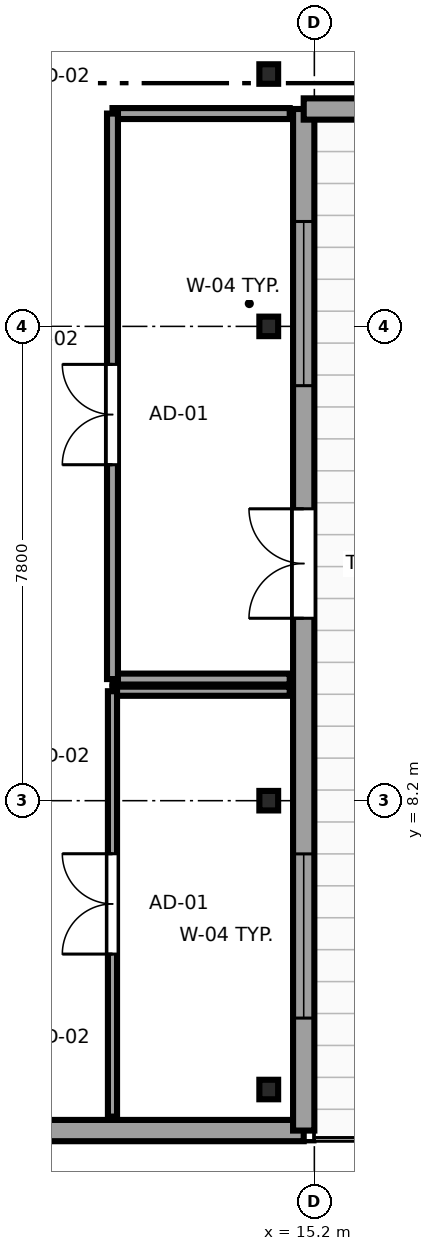
"""IFC4 building model, lengths in metres.
Left out: names, types, materials, properties, quantities, classifications, styles, units other than length and angle.
Written with IfcOpenShell. Run it as: python <this file> out.ifc"""

import sys

from ifc_helpers import new_model, si_unit, direction, frame, frame_2d, origin, origin_2d, place, context, subcontext, project, spatial, rectangle, i_section, extrude, source, transform, mapped, element, fill, save


model = new_model("IFC4")
c1 = context("Model", 3, precision=1e-05, world=origin(), true_north=direction((0.0, 1.0)))
c2 = subcontext(c1, "Body", "Model", "MODEL_VIEW")
j1 = project(units=[si_unit("LENGTHUNIT", "METRE"), si_unit("PLANEANGLEUNIT", "RADIAN")], contexts=[c1])
p1 = place(None, origin())
s1 = spatial("IfcSite", under=j1, at=p1, CompositionType="ELEMENT")
p2 = place(p1, origin())
s2 = spatial("IfcBuilding", under=s1, at=p2, CompositionType="ELEMENT")
p3 = place(p2, frame((0.0, 0.0, 241.65)))
s3 = spatial("IfcBuildingStorey", under=s2, at=p3, CompositionType="ELEMENT", Elevation=241.65)
m1 = source(origin(), c2, "Body", "SweptSolid", [
    extrude(i_section(OverallWidth=0.309, OverallDepth=0.321, WebThickness=0.014, FlangeThickness=0.022, FilletRadius=0.017, at=origin_2d()), origin(), (0.0, 0.0, 1.0), 3.55),
])
for number, where, z_axis, x_axis in (
    (1, (14.45, 3.45, 0.0), (0.0, 0.0, 1.0), (1.0, 0.0, 0.0)),
    (2, (14.45, 8.2, 0.0), (0.0, 0.0, 1.0), (1.0, 0.0, 0.0)),
    (3, (14.45, 16.0, 0.0), (0.0, 0.0, 1.0), (1.0, 0.0, 0.0)),
    (4, (14.45, 20.15, 0.0), (0.0, 0.0, 1.0), (1.0, 0.0, 0.0)),
):
    element("IfcColumn", number, at=place(p3, frame(where, z_axis=z_axis, x_axis=x_axis)), inside=s3, PredefinedType="COLUMN", context=c2, shape_type="MappedRepresentation", body=[
        mapped(m1, transform((0.0, 0.0, 0.0), x_axis=(1.0, 0.0, 0.0), y_axis=(0.0, 1.0, 0.0), z_axis=(0.0, 0.0, 1.0), scale=1.0)),
    ])
p4 = place(p3, frame((7.017, 2.775, 0.0), z_axis=(0.0, 0.0, 1.0), x_axis=(1.0, 0.0, 0.0)))
e5 = element("IfcWall", 5, at=p4, inside=s3, PredefinedType="SOLIDWALL", context=c2, shape_type="SweptSolid", body=[
    extrude(rectangle(XDim=8.008, YDim=0.35, at=frame_2d((4.004, 0.0))), origin(), (0.0, 0.0, 1.0), 3.37),
])
p5 = place(p4, frame((0.791, 0.0, 0.62)))
e6 = element("IfcOpeningElement", 6, at=p5, cuts=e5, PredefinedType="OPENING", context=c2, shape_type="SweptSolid", body=[
    extrude(rectangle(XDim=1.5, YDim=1.55, at=frame_2d((0.75, 0.775))), frame((0.0, 0.185, 0.0), z_axis=(0.0, -1.0, 0.0), x_axis=(1.0, 0.0, 0.0)), (0.0, 0.0, 1.0), 0.37),
])
p6 = place(p3, frame((15.025, 2.775, 0.0), z_axis=(0.0, 0.0, 1.0), x_axis=(0.0, 1.0, 0.0)))
e7 = element("IfcWall", 7, at=p6, inside=s3, PredefinedType="SOLIDWALL", context=c2, shape_type="SweptSolid", body=[
    extrude(rectangle(XDim=16.8, YDim=0.35, at=frame_2d((8.4, 0.0))), origin(), (0.0, 0.0, 1.0), 3.37),
])
p7 = place(p6, frame((10.225, 0.0, 0.0), z_axis=(0.0, 0.0, 1.0), x_axis=(-1.0, 0.0, 0.0)))
e8 = element("IfcOpeningElement", 8, at=p7, cuts=e7, PredefinedType="OPENING", context=c2, shape_type="SweptSolid", body=[
    extrude(rectangle(XDim=1.8, YDim=2.15, at=frame_2d((0.9, 1.075))), frame((0.0, 0.185, 0.0), z_axis=(0.0, -1.0, 0.0), x_axis=(1.0, 0.0, 0.0)), (0.0, 0.0, 1.0), 0.37),
])
p8 = place(p6, frame((1.85, 0.0, 0.68)))
e9 = element("IfcOpeningElement", 9, at=p8, cuts=e7, PredefinedType="OPENING", context=c2, shape_type="SweptSolid", body=[
    extrude(rectangle(XDim=2.7, YDim=1.95, at=frame_2d((1.35, 0.975))), frame((0.0, 0.185, 0.0), z_axis=(0.0, -1.0, 0.0), x_axis=(1.0, 0.0, 0.0)), (0.0, 0.0, 1.0), 0.37),
])
p9 = place(p6, frame((12.25, 0.0, 0.68)))
e10 = element("IfcOpeningElement", 10, at=p9, cuts=e7, PredefinedType="OPENING", context=c2, shape_type="SweptSolid", body=[
    extrude(rectangle(XDim=2.7, YDim=1.95, at=frame_2d((1.35, 0.975))), frame((0.0, 0.185, 0.0), z_axis=(0.0, -1.0, 0.0), x_axis=(1.0, 0.0, 0.0)), (0.0, 0.0, 1.0), 0.37),
])
p10 = place(p3, frame((15.025, 19.575, 0.0), z_axis=(0.0, 0.0, 1.0), x_axis=(1.0, 0.0, 0.0)))
e11 = element("IfcWall", 11, at=p10, inside=s3, PredefinedType="SOLIDWALL", context=c2, shape_type="SweptSolid", body=[
    extrude(rectangle(XDim=17.065, YDim=0.35, at=frame_2d((8.533, 0.0))), origin(), (0.0, 0.0, 1.0), 3.37),
])
p11 = place(p10, frame((1.894, 0.0, 0.68)))
e12 = element("IfcOpeningElement", 12, at=p11, cuts=e11, PredefinedType="OPENING", context=c2, shape_type="SweptSolid", body=[
    extrude(rectangle(XDim=2.7, YDim=1.95, at=frame_2d((1.35, 0.975))), frame((0.0, 0.185, 0.0), z_axis=(0.0, -1.0, 0.0), x_axis=(1.0, 0.0, 0.0)), (0.0, 0.0, 1.0), 0.37),
])
p12 = place(p10, frame((7.183, 0.0, 0.68)))
e13 = element("IfcOpeningElement", 13, at=p12, cuts=e11, PredefinedType="OPENING", context=c2, shape_type="SweptSolid", body=[
    extrude(rectangle(XDim=2.7, YDim=1.95, at=frame_2d((1.35, 0.975))), frame((0.0, 0.185, 0.0), z_axis=(0.0, -1.0, 0.0), x_axis=(1.0, 0.0, 0.0)), (0.0, 0.0, 1.0), 0.37),
])
p13 = place(p10, frame((12.471, 0.0, 0.68)))
e14 = element("IfcOpeningElement", 14, at=p13, cuts=e11, PredefinedType="OPENING", context=c2, shape_type="SweptSolid", body=[
    extrude(rectangle(XDim=2.7, YDim=1.95, at=frame_2d((1.35, 0.975))), frame((0.0, 0.185, 0.0), z_axis=(0.0, -1.0, 0.0), x_axis=(1.0, 0.0, 0.0)), (0.0, 0.0, 1.0), 0.37),
])
for number, where, z_axis, x_axis in (
    (15, (11.88, 10.2, 0.0), (0.0, 0.0, 1.0), (1.0, 0.0, 0.0)),
    (16, (11.88, 19.5, 0.0), (0.0, 0.0, 1.0), (1.0, 0.0, 0.0)),
):
    element("IfcWall", number, at=place(p3, frame(where, z_axis=z_axis, x_axis=x_axis)), inside=s3, PredefinedType="PARTITIONING", context=c2, shape_type="SweptSolid", body=[
        extrude(rectangle(XDim=2.915, YDim=0.18, at=frame_2d((1.458, 0.0))), origin(), (0.0, 0.0, 1.0), 3.37),
    ])
p14 = place(p3, frame((11.88, 10.2, 0.0), z_axis=(0.0, 0.0, 1.0), x_axis=(0.0, 1.0, 0.0)))
e17 = element("IfcWall", 17, at=p14, inside=s3, PredefinedType="PARTITIONING", context=c2, shape_type="SweptSolid", body=[
    extrude(rectangle(XDim=9.3, YDim=0.18, at=frame_2d((4.65, 0.0))), origin(), (0.0, 0.0, 1.0), 3.37),
])
p15 = place(p14, frame((3.525, 0.0, 0.0)))
e18 = element("IfcOpeningElement", 18, at=p15, cuts=e17, PredefinedType="OPENING", context=c2, shape_type="SweptSolid", body=[
    extrude(rectangle(XDim=1.65, YDim=2.15, at=frame_2d((0.825, 1.075))), frame((0.0, 0.1, 0.0), z_axis=(0.0, -1.0, 0.0), x_axis=(1.0, 0.0, 0.0)), (0.0, 0.0, 1.0), 0.2),
])
p16 = place(p3, frame((11.88, 10.0, 0.0), z_axis=(0.0, 0.0, 1.0), x_axis=(1.0, 0.0, 0.0)))
e19 = element("IfcWall", 19, at=p16, inside=s3, PredefinedType="PARTITIONING", context=c2, shape_type="SweptSolid", body=[
    extrude(rectangle(XDim=2.915, YDim=0.15, at=frame_2d((1.458, 0.0))), origin(), (0.0, 0.0, 1.0), 3.37),
])
p17 = place(p3, frame((11.88, 3.005, 0.0), z_axis=(0.0, 0.0, 1.0), x_axis=(0.0, 1.0, 0.0)))
e20 = element("IfcWall", 20, at=p17, inside=s3, PredefinedType="PARTITIONING", context=c2, shape_type="SweptSolid", body=[
    extrude(rectangle(XDim=6.995, YDim=0.15, at=frame_2d((3.498, 0.0))), origin(), (0.0, 0.0, 1.0), 3.37),
])
p18 = place(p17, frame((2.673, 0.0, 0.0)))
e21 = element("IfcOpeningElement", 21, at=p18, cuts=e20, PredefinedType="OPENING", context=c2, shape_type="SweptSolid", body=[
    extrude(rectangle(XDim=1.65, YDim=2.15, at=frame_2d((0.825, 1.075))), frame((0.0, 0.085, 0.0), z_axis=(0.0, -1.0, 0.0), x_axis=(1.0, 0.0, 0.0)), (0.0, 0.0, 1.0), 0.17),
])
m2 = source(origin(), c2, "Body", "SweptSolid", [
    extrude(rectangle(XDim=1.8, YDim=2.15, at=frame_2d((0.9, 1.075))), frame((0.0, 0.025, 0.0), z_axis=(0.0, -1.0, 0.0), x_axis=(1.0, 0.0, 0.0)), (0.0, 0.0, 1.0), 0.05),
])
p19 = place(p7, origin())
e22 = element("IfcDoor", 22, at=p19, inside=s3, OperationType="DOUBLE_DOOR_SINGLE_SWING", PredefinedType="DOOR", context=c2, shape_type="MappedRepresentation", body=[
    mapped(m2, transform((0.0, 0.0, 0.0), x_axis=(1.0, 0.0, 0.0), y_axis=(0.0, 1.0, 0.0), z_axis=(0.0, 0.0, 1.0), scale=1.0)),
])
fill(e8, e22)
m3 = source(origin(), c2, "Body", "SweptSolid", [
    extrude(rectangle(XDim=2.7, YDim=1.95, at=frame_2d((1.35, 0.975))), frame((0.0, 0.09, 0.0), z_axis=(0.0, -1.0, 0.0), x_axis=(1.0, 0.0, 0.0)), (0.0, 0.0, 1.0), 0.06),
])
p20 = place(p8, origin())
e23 = element("IfcWindow", 23, at=p20, inside=s3, PartitioningType="TRIPLE_PANEL_HORIZONTAL", PredefinedType="WINDOW", context=c2, shape_type="MappedRepresentation", body=[
    mapped(m3, transform((0.0, 0.0, 0.0), x_axis=(1.0, 0.0, 0.0), y_axis=(0.0, 1.0, 0.0), z_axis=(0.0, 0.0, 1.0), scale=1.0)),
])
fill(e9, e23)
p21 = place(p9, origin())
e24 = element("IfcWindow", 24, at=p21, inside=s3, PartitioningType="TRIPLE_PANEL_HORIZONTAL", PredefinedType="WINDOW", context=c2, shape_type="MappedRepresentation", body=[
    mapped(m3, transform((0.0, 0.0, 0.0), x_axis=(1.0, 0.0, 0.0), y_axis=(0.0, 1.0, 0.0), z_axis=(0.0, 0.0, 1.0), scale=1.0)),
])
fill(e10, e24)
m4 = source(origin(), c2, "Body", "SweptSolid", [
    extrude(rectangle(XDim=1.65, YDim=2.15, at=frame_2d((0.825, 1.075))), frame((0.0, 0.025, 0.0), z_axis=(0.0, -1.0, 0.0), x_axis=(1.0, 0.0, 0.0)), (0.0, 0.0, 1.0), 0.05),
])
p22 = place(p15, origin())
e25 = element("IfcDoor", 25, at=p22, inside=s3, OperationType="DOUBLE_DOOR_SINGLE_SWING", PredefinedType="DOOR", context=c2, shape_type="MappedRepresentation", body=[
    mapped(m4, transform((0.0, 0.0, 0.0), x_axis=(1.0, 0.0, 0.0), y_axis=(0.0, 1.0, 0.0), z_axis=(0.0, 0.0, 1.0), scale=1.0)),
])
fill(e18, e25)
p23 = place(p18, origin())
e26 = element("IfcDoor", 26, at=p23, inside=s3, OperationType="DOUBLE_DOOR_SINGLE_SWING", PredefinedType="DOOR", context=c2, shape_type="MappedRepresentation", body=[
    mapped(m4, transform((0.0, 0.0, 0.0), x_axis=(1.0, 0.0, 0.0), y_axis=(0.0, 1.0, 0.0), z_axis=(0.0, 0.0, 1.0), scale=1.0)),
])
fill(e21, e26)
save(model, sys.argv[1])
